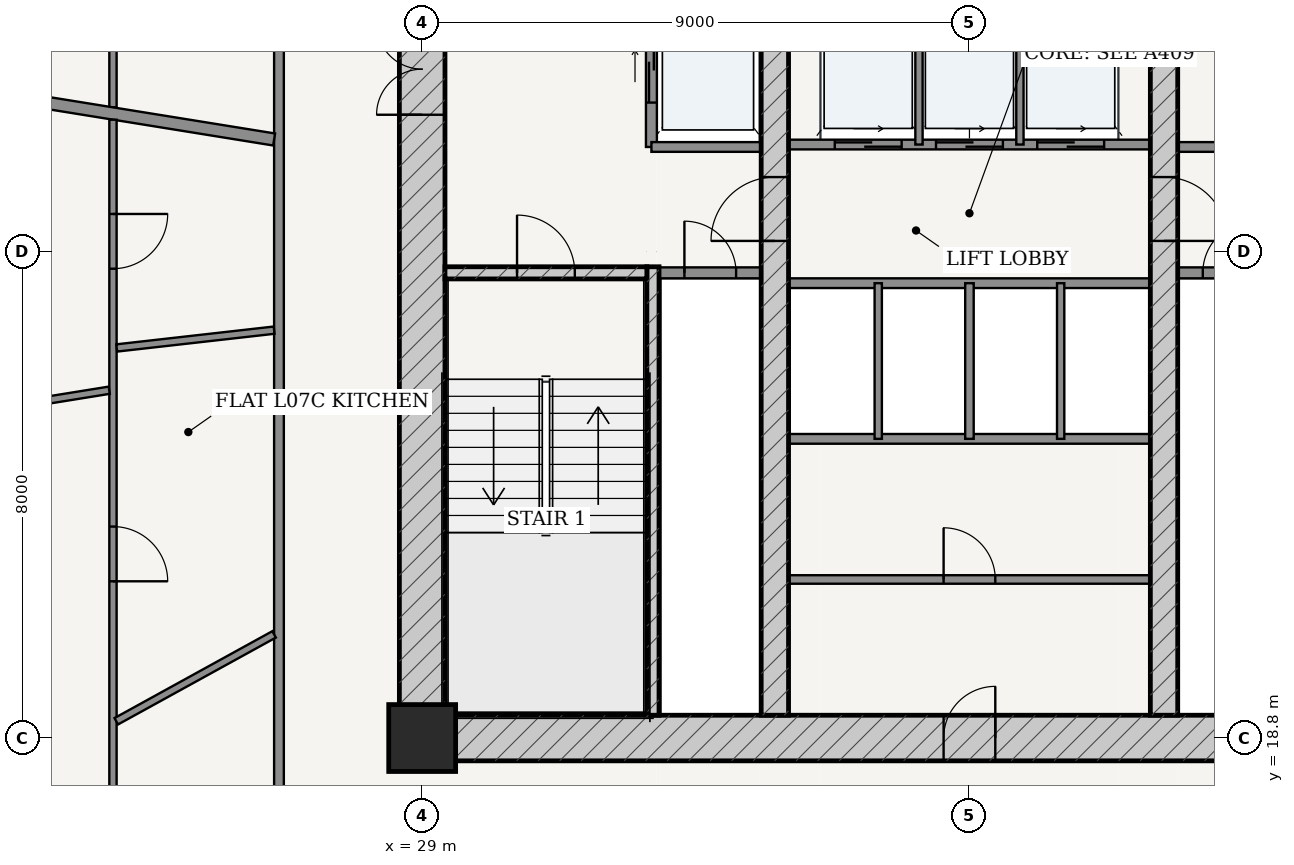
"""IFC4 building model, lengths in metres.
Left out: names, types, materials, properties, quantities, classifications, styles, units other than length and angle.
Written with IfcOpenShell. Run it as: python <this file> out.ifc"""

import sys

from ifc_helpers import new_model, si_unit, direction, frame, frame_2d, origin, origin_2d, place, context, subcontext, project, spatial, rectangle, extrude, source, transform, mapped, element, fill, save


model = new_model("IFC4")
c1 = context("Model", 3, precision=1e-05, world=origin(), true_north=direction((-0.2419218956, 0.970295726276)))
c2 = subcontext(c1, "Body", "Model", "MODEL_VIEW")
j1 = project(units=[si_unit("LENGTHUNIT", "METRE"), si_unit("PLANEANGLEUNIT", "RADIAN")], contexts=[c1])
p1 = place(None, origin())
s1 = spatial("IfcSite", under=j1, at=p1, CompositionType="ELEMENT")
p2 = place(p1, origin())
s2 = spatial("IfcBuilding", under=s1, at=p2, CompositionType="ELEMENT")
p3 = place(p2, frame((0.0, 0.0, 31.2)))
s3 = spatial("IfcBuildingStorey", under=s2, at=p3, CompositionType="ELEMENT", Elevation=31.2)
p4 = place(p3, frame((29.0, 18.8, 0.0), z_axis=(0.0, 0.0, 1.0), x_axis=(1.0, 0.0, 0.0)))
e1 = element("IfcColumn", 1, at=p4, inside=s3, PredefinedType="COLUMN", context=c2, shape_type="SweptSolid", body=[
    extrude(rectangle(XDim=1.1, YDim=1.1, at=origin_2d()), origin(), (0.0, 0.0, 1.0), 3.6),
])
p5 = place(p3, frame((28.625, 18.8, 0.0), z_axis=(0.0, 0.0, 1.0), x_axis=(1.0, 0.0, 0.0)))
e2 = element("IfcWall", 2, at=p5, inside=s3, PredefinedType="SHEAR", context=c2, shape_type="SweptSolid", body=[
    extrude(rectangle(XDim=18.75, YDim=0.75, at=frame_2d((9.375, 0.0))), origin(), (0.0, 0.0, 1.0), 3.32),
])
p6 = place(p5, frame((8.95, 0.0, 0.0)))
e3 = element("IfcOpeningElement", 3, at=p6, cuts=e2, PredefinedType="OPENING", context=c2, shape_type="SweptSolid", body=[
    extrude(rectangle(XDim=0.85, YDim=2.1, at=frame_2d((0.425, 1.05))), frame((0.0, 0.385, 0.0), z_axis=(0.0, -1.0, 0.0), x_axis=(1.0, 0.0, 0.0)), (0.0, 0.0, 1.0), 0.77),
])
p7 = place(p3, frame((29.0, 19.175, 0.0), z_axis=(0.0, 0.0, 1.0), x_axis=(0.0, 1.0, 0.0)))
e4 = element("IfcWall", 4, at=p7, inside=s3, PredefinedType="SHEAR", context=c2, shape_type="SweptSolid", body=[
    extrude(rectangle(XDim=15.25, YDim=0.75, at=frame_2d((7.625, 0.0))), origin(), (0.0, 0.0, 1.0), 3.32),
])
p8 = place(p7, frame((9.875, 0.0, 0.0)))
e5 = element("IfcOpeningElement", 5, at=p8, cuts=e4, PredefinedType="OPENING", context=c2, shape_type="SweptSolid", body=[
    extrude(rectangle(XDim=1.5, YDim=2.2, at=frame_2d((0.75, 1.1))), frame((0.0, 0.385, 0.0), z_axis=(0.0, -1.0, 0.0), x_axis=(1.0, 0.0, 0.0)), (0.0, 0.0, 1.0), 0.77),
])
p9 = place(p3, frame((32.795, 19.175, 0.0), z_axis=(0.0, 0.0, 1.0), x_axis=(0.0, 1.0, 0.0)))
e6 = element("IfcWall", 6, at=p9, inside=s3, PredefinedType="SOLIDWALL", context=c2, shape_type="SweptSolid", body=[
    extrude(rectangle(XDim=7.375, YDim=0.2, at=frame_2d((3.688, 0.0))), origin(), (0.0, 0.0, 1.0), 3.32),
])
p10 = place(p3, frame((29.375, 26.45, 0.0), z_axis=(0.0, 0.0, 1.0), x_axis=(1.0, 0.0, 0.0)))
e7 = element("IfcWall", 7, at=p10, inside=s3, PredefinedType="SOLIDWALL", context=c2, shape_type="SweptSolid", body=[
    extrude(rectangle(XDim=3.32, YDim=0.2, at=frame_2d((1.66, 0.0))), origin(), (0.0, 0.0, 1.0), 3.32),
])
p11 = place(p10, frame((1.185, 0.0, 0.0)))
e8 = element("IfcOpeningElement", 8, at=p11, cuts=e7, PredefinedType="OPENING", context=c2, shape_type="SweptSolid", body=[
    extrude(rectangle(XDim=0.95, YDim=2.15, at=frame_2d((0.475, 1.075))), frame((0.0, 0.11, 0.0), z_axis=(0.0, -1.0, 0.0), x_axis=(1.0, 0.0, 0.0)), (0.0, 0.0, 1.0), 0.22),
])
p12 = place(p3, frame((34.8, 19.175, 0.0), z_axis=(0.0, 0.0, 1.0), x_axis=(0.0, 1.0, 0.0)))
e9 = element("IfcWall", 9, at=p12, inside=s3, PredefinedType="SHEAR", context=c2, shape_type="SweptSolid", body=[
    extrude(rectangle(XDim=15.25, YDim=0.45, at=frame_2d((7.625, 0.0))), origin(), (0.0, 0.0, 1.0), 3.32),
])
p13 = place(p12, frame((7.8, 0.0, 0.0)))
e10 = element("IfcOpeningElement", 10, at=p13, cuts=e9, PredefinedType="OPENING", context=c2, shape_type="SweptSolid", body=[
    extrude(rectangle(XDim=1.05, YDim=2.15, at=frame_2d((0.525, 1.075))), frame((0.0, 0.235, 0.0), z_axis=(0.0, -1.0, 0.0), x_axis=(1.0, 0.0, 0.0)), (0.0, 0.0, 1.0), 0.47),
])
p14 = place(p3, frame((41.2, 19.175, 0.0), z_axis=(0.0, 0.0, 1.0), x_axis=(0.0, 1.0, 0.0)))
e11 = element("IfcWall", 11, at=p14, inside=s3, PredefinedType="SHEAR", context=c2, shape_type="SweptSolid", body=[
    extrude(rectangle(XDim=15.25, YDim=0.45, at=frame_2d((7.625, 0.0))), origin(), (0.0, 0.0, 1.0), 3.32),
])
p15 = place(p14, frame((7.8, 0.0, 0.0)))
e12 = element("IfcOpeningElement", 12, at=p15, cuts=e11, PredefinedType="OPENING", context=c2, shape_type="SweptSolid", body=[
    extrude(rectangle(XDim=1.05, YDim=2.15, at=frame_2d((0.525, 1.075))), frame((0.0, 0.235, 0.0), z_axis=(0.0, -1.0, 0.0), x_axis=(1.0, 0.0, 0.0)), (0.0, 0.0, 1.0), 0.47),
])
p16 = place(p3, frame((32.9, 26.45, 0.0), z_axis=(0.0, 0.0, 1.0), x_axis=(1.0, 0.0, 0.0)))
e13 = element("IfcWall", 13, at=p16, inside=s3, PredefinedType="PARTITIONING", context=c2, shape_type="SweptSolid", body=[
    extrude(rectangle(XDim=1.675, YDim=0.18, at=frame_2d((0.837, 0.0))), origin(), (0.0, 0.0, 1.0), 3.32),
])
p17 = place(p16, frame((0.413, 0.0, 0.0)))
e14 = element("IfcOpeningElement", 14, at=p17, cuts=e13, PredefinedType="OPENING", context=c2, shape_type="SweptSolid", body=[
    extrude(rectangle(XDim=0.85, YDim=2.1, at=frame_2d((0.425, 1.05))), frame((0.0, 0.1, 0.0), z_axis=(0.0, -1.0, 0.0), x_axis=(1.0, 0.0, 0.0)), (0.0, 0.0, 1.0), 0.2),
])
p18 = place(p3, frame((41.425, 26.45, 0.0), z_axis=(0.0, 0.0, 1.0), x_axis=(1.0, 0.0, 0.0)))
e15 = element("IfcWall", 15, at=p18, inside=s3, PredefinedType="PARTITIONING", context=c2, shape_type="SweptSolid", body=[
    extrude(rectangle(XDim=1.675, YDim=0.18, at=frame_2d((0.837, 0.0))), origin(), (0.0, 0.0, 1.0), 3.32),
])
p19 = place(p18, frame((0.413, 0.0, 0.0)))
e16 = element("IfcOpeningElement", 16, at=p19, cuts=e15, PredefinedType="OPENING", context=c2, shape_type="SweptSolid", body=[
    extrude(rectangle(XDim=0.85, YDim=2.1, at=frame_2d((0.425, 1.05))), frame((0.0, 0.1, 0.0), z_axis=(0.0, -1.0, 0.0), x_axis=(1.0, 0.0, 0.0)), (0.0, 0.0, 1.0), 0.2),
])
p20 = place(p3, frame((32.77, 28.52, 0.0), z_axis=(0.0, 0.0, 1.0), x_axis=(0.0, 1.0, 0.0)))
e17 = element("IfcWall", 17, at=p20, inside=s3, PredefinedType="PARTITIONING", context=c2, shape_type="SweptSolid", body=[
    extrude(rectangle(XDim=5.905, YDim=0.18, at=frame_2d((2.953, 0.0))), origin(), (0.0, 0.0, 1.0), 3.32),
])
p21 = place(p20, frame((3.655, 0.0, 0.0)))
e18 = element("IfcOpeningElement", 18, at=p21, cuts=e17, PredefinedType="OPENING", context=c2, shape_type="SweptSolid", body=[
    extrude(rectangle(XDim=1.15, YDim=2.2, at=frame_2d((0.575, 1.1))), frame((0.0, 0.1, 0.0), z_axis=(0.0, -1.0, 0.0), x_axis=(1.0, 0.0, 0.0)), (0.0, 0.0, 1.0), 0.2),
])
p22 = place(p20, frame((0.73, 0.0, 0.0)))
e19 = element("IfcOpeningElement", 19, at=p22, cuts=e17, PredefinedType="OPENING", context=c2, shape_type="SweptSolid", body=[
    extrude(rectangle(XDim=1.2, YDim=2.25, at=frame_2d((0.6, 1.125))), frame((0.0, 0.1, 0.0), z_axis=(0.0, -1.0, 0.0), x_axis=(1.0, 0.0, 0.0)), (0.0, 0.0, 1.0), 0.2),
])
for number, where, z_axis, x_axis in (
    (20, (32.77, 28.52, 0.0), (0.0, 0.0, 1.0), (1.0, 0.0, 0.0)),
    (21, (41.425, 28.52, 0.0), (0.0, 0.0, 1.0), (1.0, 0.0, 0.0)),
):
    element("IfcWall", number, at=place(p3, frame(where, z_axis=z_axis, x_axis=x_axis)), inside=s3, PredefinedType="PARTITIONING", context=c2, shape_type="SweptSolid", body=[
        extrude(rectangle(XDim=1.805, YDim=0.16, at=frame_2d((0.902, 0.0))), origin(), (0.0, 0.0, 1.0), 3.32),
    ])
p23 = place(p3, frame((35.025, 28.56, 0.0), z_axis=(0.0, 0.0, 1.0), x_axis=(1.0, 0.0, 0.0)))
e22 = element("IfcWall", 22, at=p23, inside=s3, PredefinedType="PARTITIONING", context=c2, shape_type="SweptSolid", body=[
    extrude(rectangle(XDim=5.95, YDim=0.16, at=frame_2d((2.975, 0.0))), origin(), (0.0, 0.0, 1.0), 3.32),
])
p24 = place(p23, frame((0.76, 0.0, 0.0)))
e23 = element("IfcOpeningElement", 23, at=p24, cuts=e22, PredefinedType="OPENING", context=c2, shape_type="SweptSolid", body=[
    extrude(rectangle(XDim=1.1, YDim=2.2, at=frame_2d((0.55, 1.1))), frame((0.0, 0.09, 0.0), z_axis=(0.0, -1.0, 0.0), x_axis=(1.0, 0.0, 0.0)), (0.0, 0.0, 1.0), 0.18),
])
p25 = place(p23, frame((2.425, 0.0, 0.0)))
e24 = element("IfcOpeningElement", 24, at=p25, cuts=e22, PredefinedType="OPENING", context=c2, shape_type="SweptSolid", body=[
    extrude(rectangle(XDim=1.1, YDim=2.2, at=frame_2d((0.55, 1.1))), frame((0.0, 0.09, 0.0), z_axis=(0.0, -1.0, 0.0), x_axis=(1.0, 0.0, 0.0)), (0.0, 0.0, 1.0), 0.18),
])
p26 = place(p23, frame((4.09, 0.0, 0.0)))
e25 = element("IfcOpeningElement", 25, at=p26, cuts=e22, PredefinedType="OPENING", context=c2, shape_type="SweptSolid", body=[
    extrude(rectangle(XDim=1.1, YDim=2.2, at=frame_2d((0.55, 1.1))), frame((0.0, 0.09, 0.0), z_axis=(0.0, -1.0, 0.0), x_axis=(1.0, 0.0, 0.0)), (0.0, 0.0, 1.0), 0.18),
])
for number, where, z_axis, x_axis in (
    (26, (37.17, 28.56, 0.0), (0.0, 0.0, 1.0), (0.0, 1.0, 0.0)),
    (27, (38.83, 28.56, 0.0), (0.0, 0.0, 1.0), (0.0, 1.0, 0.0)),
):
    element("IfcWall", number, at=place(p3, frame(where, z_axis=z_axis, x_axis=x_axis)), inside=s3, PredefinedType="PARTITIONING", context=c2, shape_type="SweptSolid", body=[
        extrude(rectangle(XDim=2.56, YDim=0.12, at=frame_2d((1.28, 0.0))), origin(), (0.0, 0.0, 1.0), 3.32),
    ])
for number, where, z_axis, x_axis in (
    (28, (35.025, 26.28, 0.0), (0.0, 0.0, 1.0), (1.0, 0.0, 0.0)),
    (29, (35.025, 23.72, 0.0), (0.0, 0.0, 1.0), (1.0, 0.0, 0.0)),
):
    element("IfcWall", number, at=place(p3, frame(where, z_axis=z_axis, x_axis=x_axis)), inside=s3, PredefinedType="PARTITIONING", context=c2, shape_type="SweptSolid", body=[
        extrude(rectangle(XDim=5.95, YDim=0.16, at=frame_2d((2.975, 0.0))), origin(), (0.0, 0.0, 1.0), 3.32),
    ])
p27 = place(p3, frame((36.5, 23.72, 0.0), z_axis=(0.0, 0.0, 1.0), x_axis=(0.0, 1.0, 0.0)))
e30 = element("IfcWall", 30, at=p27, inside=s3, PredefinedType="PARTITIONING", context=c2, shape_type="SweptSolid", body=[
    extrude(rectangle(XDim=2.56, YDim=0.12, at=frame_2d((1.28, 0.0))), origin(), (0.0, 0.0, 1.0), 3.32),
])
p28 = place(p3, frame((38.0, 23.72, 0.0), z_axis=(0.0, 0.0, 1.0), x_axis=(0.0, 1.0, 0.0)))
e31 = element("IfcWall", 31, at=p28, inside=s3, PredefinedType="PARTITIONING", context=c2, shape_type="SweptSolid", body=[
    extrude(rectangle(XDim=2.56, YDim=0.14, at=frame_2d((1.28, 0.0))), origin(), (0.0, 0.0, 1.0), 3.32),
])
p29 = place(p3, frame((39.5, 23.72, 0.0), z_axis=(0.0, 0.0, 1.0), x_axis=(0.0, 1.0, 0.0)))
e32 = element("IfcWall", 32, at=p29, inside=s3, PredefinedType="PARTITIONING", context=c2, shape_type="SweptSolid", body=[
    extrude(rectangle(XDim=2.56, YDim=0.12, at=frame_2d((1.28, 0.0))), origin(), (0.0, 0.0, 1.0), 3.32),
])
p30 = place(p3, frame((35.025, 21.407, 0.0), z_axis=(0.0, 0.0, 1.0), x_axis=(1.0, 0.0, 0.0)))
e33 = element("IfcWall", 33, at=p30, inside=s3, PredefinedType="PARTITIONING", context=c2, shape_type="SweptSolid", body=[
    extrude(rectangle(XDim=5.95, YDim=0.14, at=frame_2d((2.975, 0.0))), origin(), (0.0, 0.0, 1.0), 3.32),
])
p31 = place(p30, frame((2.55, 0.0, 0.0)))
e34 = element("IfcOpeningElement", 34, at=p31, cuts=e33, PredefinedType="OPENING", context=c2, shape_type="SweptSolid", body=[
    extrude(rectangle(XDim=0.85, YDim=2.1, at=frame_2d((0.425, 1.05))), frame((0.0, 0.08, 0.0), z_axis=(0.0, -1.0, 0.0), x_axis=(1.0, 0.0, 0.0)), (0.0, 0.0, 1.0), 0.16),
])
p32 = place(p3, frame((26.645, 16.525, 0.0), z_axis=(0.0, 0.0, 1.0), x_axis=(0.0, 1.0, 0.0)))
e35 = element("IfcWall", 35, at=p32, inside=s3, PredefinedType="PARTITIONING", context=c2, shape_type="SweptSolid", body=[
    extrude(rectangle(XDim=20.55, YDim=0.16, at=frame_2d((10.275, 0.0))), origin(), (0.0, 0.0, 1.0), 2.688),
])
p33 = place(p3, frame((23.915, 29.172, 0.0), z_axis=(0.0, 0.0, 1.0), x_axis=(0.0, 1.0, 0.0)))
e36 = element("IfcWall", 36, at=p33, inside=s3, PredefinedType="PARTITIONING", context=c2, shape_type="SweptSolid", body=[
    extrude(rectangle(XDim=10.713, YDim=0.12, at=frame_2d((5.356, 0.0))), origin(), (0.0, 0.0, 1.0), 2.688),
])
p34 = place(p33, frame((3.666, 0.0, 0.0)))
e37 = element("IfcOpeningElement", 37, at=p34, cuts=e36, PredefinedType="OPENING", context=c2, shape_type="SweptSolid", body=[
    extrude(rectangle(XDim=0.9, YDim=2.15, at=frame_2d((0.45, 1.075))), frame((0.0, 0.07, 0.0), z_axis=(0.0, -1.0, 0.0), x_axis=(1.0, 0.0, 0.0)), (0.0, 0.0, 1.0), 0.14),
])
p35 = place(p3, frame((26.565, 28.643, 0.0), z_axis=(0.0, 0.0, 1.0), x_axis=(-0.987255953651, 0.159140447344, 0.0)))
e38 = element("IfcWall", 38, at=p35, inside=s3, PredefinedType="PARTITIONING", context=c2, shape_type="SweptSolid", body=[
    extrude(rectangle(XDim=17.105, YDim=0.2, at=frame_2d((8.553, 0.0))), origin(), (0.0, 0.0, 1.0), 2.688),
])
p36 = place(p3, frame((23.915, 13.715, 0.0), z_axis=(0.0, 0.0, 1.0), x_axis=(0.0, 1.0, 0.0)))
e39 = element("IfcWall", 39, at=p36, inside=s3, PredefinedType="PARTITIONING", context=c2, shape_type="SweptSolid", body=[
    extrude(rectangle(XDim=15.253, YDim=0.12, at=frame_2d((7.626, 0.0))), origin(), (0.0, 0.0, 1.0), 2.688),
])
p37 = place(p36, frame((7.663, 0.0, 0.0)))
e40 = element("IfcOpeningElement", 40, at=p37, cuts=e39, PredefinedType="OPENING", context=c2, shape_type="SweptSolid", body=[
    extrude(rectangle(XDim=0.9, YDim=2.15, at=frame_2d((0.45, 1.075))), frame((0.0, 0.07, 0.0), z_axis=(0.0, -1.0, 0.0), x_axis=(1.0, 0.0, 0.0)), (0.0, 0.0, 1.0), 0.14),
])
p38 = place(p36, frame((12.803, 0.0, 0.0)))
e41 = element("IfcOpeningElement", 41, at=p38, cuts=e39, PredefinedType="OPENING", context=c2, shape_type="SweptSolid", body=[
    extrude(rectangle(XDim=0.9, YDim=2.15, at=frame_2d((0.45, 1.075))), frame((0.0, 0.07, 0.0), z_axis=(0.0, -1.0, 0.0), x_axis=(1.0, 0.0, 0.0)), (0.0, 0.0, 1.0), 0.14),
])
p39 = place(p3, frame((23.854, 24.52, 0.0), z_axis=(0.0, 0.0, 1.0), x_axis=(-0.987258444847, -0.159124991997, 0.0)))
e42 = element("IfcWall", 42, at=p39, inside=s3, PredefinedType="PARTITIONING", context=c2, shape_type="SweptSolid", body=[
    extrude(rectangle(XDim=14.359, YDim=0.12, at=frame_2d((7.18, 0.0))), origin(), (0.0, 0.0, 1.0), 2.688),
])
p40 = place(p39, frame((5.659, 0.0, 0.0)))
e43 = element("IfcOpeningElement", 43, at=p40, cuts=e42, PredefinedType="OPENING", context=c2, shape_type="SweptSolid", body=[
    extrude(rectangle(XDim=0.9, YDim=2.15, at=frame_2d((0.45, 1.075))), frame((0.0, 0.07, 0.0), z_axis=(0.0, -1.0, 0.0), x_axis=(1.0, 0.0, 0.0)), (0.0, 0.0, 1.0), 0.14),
])
p41 = place(p3, frame((26.565, 25.507, 0.0), z_axis=(0.0, 0.0, 1.0), x_axis=(-0.993676271227, -0.112282981789, 0.0)))
e44 = element("IfcWall", 44, at=p41, inside=s3, PredefinedType="PARTITIONING", context=c2, shape_type="SweptSolid", body=[
    extrude(rectangle(XDim=2.605, YDim=0.12, at=frame_2d((1.302, 0.0))), origin(), (0.0, 0.0, 1.0), 3.32),
])
p42 = place(p3, frame((26.565, 20.505, 0.0), z_axis=(0.0, 0.0, 1.0), x_axis=(-0.876027961584, -0.482260314066, 0.0)))
e45 = element("IfcWall", 45, at=p42, inside=s3, PredefinedType="PARTITIONING", context=c2, shape_type="SweptSolid", body=[
    extrude(rectangle(XDim=2.963, YDim=0.12, at=frame_2d((1.481, 0.0))), origin(), (0.0, 0.0, 1.0), 2.688),
])
m1 = source(origin(), c2, "Body", "SweptSolid", [
    extrude(rectangle(XDim=1.5, YDim=2.2, at=frame_2d((0.75, 1.1))), frame((0.0, 0.025, 0.0), z_axis=(0.0, -1.0, 0.0), x_axis=(1.0, 0.0, 0.0)), (0.0, 0.0, 1.0), 0.05),
])
p43 = place(p8, origin())
e46 = element("IfcDoor", 46, at=p43, inside=s3, OperationType="DOUBLE_DOOR_SINGLE_SWING", PredefinedType="DOOR", context=c2, shape_type="MappedRepresentation", body=[
    mapped(m1, transform((0.0, 0.0, 0.0), scale=1.0)),
])
fill(e5, e46)
m2 = source(origin(), c2, "Body", "SweptSolid", [
    extrude(rectangle(XDim=1.05, YDim=2.15, at=frame_2d((0.525, 1.075))), frame((0.0, 0.025, 0.0), z_axis=(0.0, -1.0, 0.0), x_axis=(1.0, 0.0, 0.0)), (0.0, 0.0, 1.0), 0.05),
])
p44 = place(p13, origin())
e47 = element("IfcDoor", 47, at=p44, inside=s3, OperationType="SINGLE_SWING_LEFT", PredefinedType="DOOR", context=c2, shape_type="MappedRepresentation", body=[
    mapped(m2, transform((0.0, 0.0, 0.0), scale=1.0)),
])
fill(e10, e47)
p45 = place(p15, frame((1.05, 0.0, 0.0), z_axis=(0.0, 0.0, 1.0), x_axis=(-1.0, 0.0, 0.0)))
e48 = element("IfcDoor", 48, at=p45, inside=s3, OperationType="SINGLE_SWING_RIGHT", PredefinedType="DOOR", context=c2, shape_type="MappedRepresentation", body=[
    mapped(m2, transform((0.0, 0.0, 0.0), scale=1.0)),
])
fill(e12, e48)
m3 = source(origin(), c2, "Body", "SweptSolid", [
    extrude(rectangle(XDim=0.95, YDim=2.15, at=frame_2d((0.475, 1.075))), frame((0.0, 0.025, 0.0), z_axis=(0.0, -1.0, 0.0), x_axis=(1.0, 0.0, 0.0)), (0.0, 0.0, 1.0), 0.05),
])
p46 = place(p11, origin())
e49 = element("IfcDoor", 49, at=p46, inside=s3, OperationType="SINGLE_SWING_LEFT", PredefinedType="DOOR", context=c2, shape_type="MappedRepresentation", body=[
    mapped(m3, transform((0.0, 0.0, 0.0), scale=1.0)),
])
fill(e8, e49)
m4 = source(origin(), c2, "Body", "SweptSolid", [
    extrude(rectangle(XDim=0.85, YDim=2.1, at=frame_2d((0.425, 1.05))), frame((0.0, 0.025, 0.0), z_axis=(0.0, -1.0, 0.0), x_axis=(1.0, 0.0, 0.0)), (0.0, 0.0, 1.0), 0.05),
])
p47 = place(p17, origin())
e50 = element("IfcDoor", 50, at=p47, inside=s3, OperationType="SINGLE_SWING_LEFT", PredefinedType="DOOR", context=c2, shape_type="MappedRepresentation", body=[
    mapped(m4, transform((0.0, 0.0, 0.0), scale=1.0)),
])
fill(e14, e50)
p48 = place(p19, origin())
e51 = element("IfcDoor", 51, at=p48, inside=s3, OperationType="SINGLE_SWING_RIGHT", PredefinedType="DOOR", context=c2, shape_type="MappedRepresentation", body=[
    mapped(m4, transform((0.0, 0.0, 0.0), scale=1.0)),
])
fill(e16, e51)
p49 = place(p6, origin())
e52 = element("IfcDoor", 52, at=p49, inside=s3, OperationType="SINGLE_SWING_RIGHT", PredefinedType="DOOR", context=c2, shape_type="MappedRepresentation", body=[
    mapped(m4, transform((0.0, 0.0, 0.0), scale=1.0)),
])
fill(e3, e52)
p50 = place(p31, origin())
e53 = element("IfcDoor", 53, at=p50, inside=s3, OperationType="SINGLE_SWING_LEFT", PredefinedType="DOOR", context=c2, shape_type="MappedRepresentation", body=[
    mapped(m4, transform((0.0, 0.0, 0.0), scale=1.0)),
])
fill(e34, e53)
m5 = source(origin(), c2, "Body", "SweptSolid", [
    extrude(rectangle(XDim=1.2, YDim=2.25, at=frame_2d((0.6, 1.125))), frame((0.0, 0.025, 0.0), z_axis=(0.0, -1.0, 0.0), x_axis=(1.0, 0.0, 0.0)), (0.0, 0.0, 1.0), 0.05),
])
p51 = place(p22, origin())
e54 = element("IfcDoor", 54, at=p51, inside=s3, OperationType="DOUBLE_DOOR_SLIDING", PredefinedType="DOOR", context=c2, shape_type="MappedRepresentation", body=[
    mapped(m5, transform((0.0, 0.0, 0.0), scale=1.0)),
])
fill(e19, e54)
m6 = source(origin(), c2, "Body", "SweptSolid", [
    extrude(rectangle(XDim=1.1, YDim=2.2, at=frame_2d((0.55, 1.1))), frame((0.0, 0.025, 0.0), z_axis=(0.0, -1.0, 0.0), x_axis=(1.0, 0.0, 0.0)), (0.0, 0.0, 1.0), 0.05),
])
p52 = place(p24, origin())
e55 = element("IfcDoor", 55, at=p52, inside=s3, OperationType="DOUBLE_DOOR_SLIDING", PredefinedType="DOOR", context=c2, shape_type="MappedRepresentation", body=[
    mapped(m6, transform((0.0, 0.0, 0.0), scale=1.0)),
])
fill(e23, e55)
p53 = place(p25, origin())
e56 = element("IfcDoor", 56, at=p53, inside=s3, OperationType="DOUBLE_DOOR_SLIDING", PredefinedType="DOOR", context=c2, shape_type="MappedRepresentation", body=[
    mapped(m6, transform((0.0, 0.0, 0.0), scale=1.0)),
])
fill(e24, e56)
p54 = place(p26, origin())
e57 = element("IfcDoor", 57, at=p54, inside=s3, OperationType="DOUBLE_DOOR_SLIDING", PredefinedType="DOOR", context=c2, shape_type="MappedRepresentation", body=[
    mapped(m6, transform((0.0, 0.0, 0.0), scale=1.0)),
])
fill(e25, e57)
m7 = source(origin(), c2, "Body", "SweptSolid", [
    extrude(rectangle(XDim=0.9, YDim=2.15, at=frame_2d((0.45, 1.075))), frame((0.0, 0.025, 0.0), z_axis=(0.0, -1.0, 0.0), x_axis=(1.0, 0.0, 0.0)), (0.0, 0.0, 1.0), 0.05),
])
p55 = place(p37, frame((0.9, 0.0, 0.0), z_axis=(0.0, 0.0, 1.0), x_axis=(-1.0, 0.0, 0.0)))
e58 = element("IfcDoor", 58, at=p55, inside=s3, OperationType="SINGLE_SWING_RIGHT", PredefinedType="DOOR", context=c2, shape_type="MappedRepresentation", body=[
    mapped(m7, transform((0.0, 0.0, 0.0), scale=1.0)),
])
fill(e40, e58)
p56 = place(p38, frame((0.9, 0.0, 0.0), z_axis=(0.0, 0.0, 1.0), x_axis=(-1.0, 0.0, 0.0)))
e59 = element("IfcDoor", 59, at=p56, inside=s3, OperationType="SINGLE_SWING_LEFT", PredefinedType="DOOR", context=c2, shape_type="MappedRepresentation", body=[
    mapped(m7, transform((0.0, 0.0, 0.0), scale=1.0)),
])
fill(e41, e59)
save(model, sys.argv[1])
